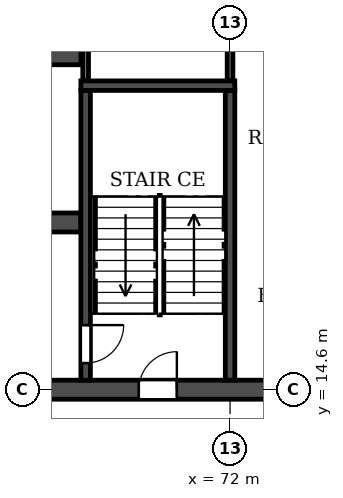
"""IFC4 building model, lengths in metres.
Left out: names, types, materials, properties, quantities, classifications, styles, units other than length and angle.
Written with IfcOpenShell. Run it as: python <this file> out.ifc"""

import sys

from ifc_helpers import new_model, si_unit, direction, frame, frame_2d, origin, place, context, subcontext, project, spatial, rectangle, extrude, element, fill, save


model = new_model("IFC4")
c1 = context("Model", 3, precision=1e-05, world=origin(), true_north=direction((0.0, 1.0)))
c2 = subcontext(c1, "Body", "Model", "MODEL_VIEW")
j1 = project(units=[si_unit("LENGTHUNIT", "METRE"), si_unit("PLANEANGLEUNIT", "RADIAN")], contexts=[c1])
p1 = place(None, origin())
s1 = spatial("IfcSite", under=j1, at=p1, CompositionType="ELEMENT")
p2 = place(p1, origin())
s2 = spatial("IfcBuilding", under=s1, at=p2, CompositionType="ELEMENT")
p3 = place(p2, frame((0.0, 0.0, 72.9)))
s3 = spatial("IfcBuildingStorey", under=s2, at=p3, CompositionType="ELEMENT", Elevation=72.9)
p4 = place(p3, frame((8.6, 14.6, 0.0), z_axis=(0.0, 0.0, 1.0), x_axis=(1.0, 0.0, 0.0)))
e1 = element("IfcWall", 1, at=p4, inside=s3, PredefinedType="SOLIDWALL", context=c2, shape_type="SweptSolid", body=[
    extrude(rectangle(XDim=84.8, YDim=0.5, at=frame_2d((42.4, 0.0))), origin(), (0.0, 0.0, 1.0), 3.06),
])
p5 = place(p4, frame((2.25, 0.0, 0.0)))
e2 = element("IfcOpeningElement", 2, at=p5, cuts=e1, PredefinedType="OPENING", context=c2, shape_type="SweptSolid", body=[
    extrude(rectangle(XDim=1.0, YDim=2.1, at=frame_2d((0.5, 1.05))), frame((0.0, 0.26, 0.0), z_axis=(0.0, -1.0, 0.0), x_axis=(1.0, 0.0, 0.0)), (0.0, 0.0, 1.0), 0.52),
])
p6 = place(p4, frame((6.95, 0.0, 0.0)))
e3 = element("IfcOpeningElement", 3, at=p6, cuts=e1, PredefinedType="OPENING", context=c2, shape_type="SweptSolid", body=[
    extrude(rectangle(XDim=1.0, YDim=2.1, at=frame_2d((0.5, 1.05))), frame((0.0, 0.26, 0.0), z_axis=(0.0, -1.0, 0.0), x_axis=(1.0, 0.0, 0.0)), (0.0, 0.0, 1.0), 0.52),
])
p7 = place(p4, frame((10.3, 0.0, 0.0)))
e4 = element("IfcOpeningElement", 4, at=p7, cuts=e1, PredefinedType="OPENING", context=c2, shape_type="SweptSolid", body=[
    extrude(rectangle(XDim=1.0, YDim=2.1, at=frame_2d((0.5, 1.05))), frame((0.0, 0.26, 0.0), z_axis=(0.0, -1.0, 0.0), x_axis=(1.0, 0.0, 0.0)), (0.0, 0.0, 1.0), 0.52),
])
p8 = place(p4, frame((18.2, 0.0, 0.0)))
e5 = element("IfcOpeningElement", 5, at=p8, cuts=e1, PredefinedType="OPENING", context=c2, shape_type="SweptSolid", body=[
    extrude(rectangle(XDim=1.0, YDim=2.1, at=frame_2d((0.5, 1.05))), frame((0.0, 0.26, 0.0), z_axis=(0.0, -1.0, 0.0), x_axis=(1.0, 0.0, 0.0)), (0.0, 0.0, 1.0), 0.52),
])
p9 = place(p4, frame((22.8, 0.0, 0.0)))
e6 = element("IfcOpeningElement", 6, at=p9, cuts=e1, PredefinedType="OPENING", context=c2, shape_type="SweptSolid", body=[
    extrude(rectangle(XDim=1.0, YDim=2.1, at=frame_2d((0.5, 1.05))), frame((0.0, 0.26, 0.0), z_axis=(0.0, -1.0, 0.0), x_axis=(1.0, 0.0, 0.0)), (0.0, 0.0, 1.0), 0.52),
])
p10 = place(p4, frame((35.4, 0.0, 0.0)))
e7 = element("IfcOpeningElement", 7, at=p10, cuts=e1, PredefinedType="OPENING", context=c2, shape_type="SweptSolid", body=[
    extrude(rectangle(XDim=1.0, YDim=2.1, at=frame_2d((0.5, 1.05))), frame((0.0, 0.26, 0.0), z_axis=(0.0, -1.0, 0.0), x_axis=(1.0, 0.0, 0.0)), (0.0, 0.0, 1.0), 0.52),
])
p11 = place(p4, frame((39.3, 0.0, 0.0)))
e8 = element("IfcOpeningElement", 8, at=p11, cuts=e1, PredefinedType="OPENING", context=c2, shape_type="SweptSolid", body=[
    extrude(rectangle(XDim=1.0, YDim=2.1, at=frame_2d((0.5, 1.05))), frame((0.0, 0.26, 0.0), z_axis=(0.0, -1.0, 0.0), x_axis=(1.0, 0.0, 0.0)), (0.0, 0.0, 1.0), 0.52),
])
p12 = place(p4, frame((41.9, 0.0, 0.0)))
e9 = element("IfcOpeningElement", 9, at=p12, cuts=e1, PredefinedType="OPENING", context=c2, shape_type="SweptSolid", body=[
    extrude(rectangle(XDim=1.0, YDim=2.1, at=frame_2d((0.5, 1.05))), frame((0.0, 0.26, 0.0), z_axis=(0.0, -1.0, 0.0), x_axis=(1.0, 0.0, 0.0)), (0.0, 0.0, 1.0), 0.52),
])
p13 = place(p4, frame((44.5, 0.0, 0.0)))
e10 = element("IfcOpeningElement", 10, at=p13, cuts=e1, PredefinedType="OPENING", context=c2, shape_type="SweptSolid", body=[
    extrude(rectangle(XDim=1.0, YDim=2.1, at=frame_2d((0.5, 1.05))), frame((0.0, 0.26, 0.0), z_axis=(0.0, -1.0, 0.0), x_axis=(1.0, 0.0, 0.0)), (0.0, 0.0, 1.0), 0.52),
])
p14 = place(p4, frame((48.4, 0.0, 0.0)))
e11 = element("IfcOpeningElement", 11, at=p14, cuts=e1, PredefinedType="OPENING", context=c2, shape_type="SweptSolid", body=[
    extrude(rectangle(XDim=1.0, YDim=2.1, at=frame_2d((0.5, 1.05))), frame((0.0, 0.26, 0.0), z_axis=(0.0, -1.0, 0.0), x_axis=(1.0, 0.0, 0.0)), (0.0, 0.0, 1.0), 0.52),
])
p15 = place(p4, frame((61.0, 0.0, 0.0)))
e12 = element("IfcOpeningElement", 12, at=p15, cuts=e1, PredefinedType="OPENING", context=c2, shape_type="SweptSolid", body=[
    extrude(rectangle(XDim=1.0, YDim=2.1, at=frame_2d((0.5, 1.05))), frame((0.0, 0.26, 0.0), z_axis=(0.0, -1.0, 0.0), x_axis=(1.0, 0.0, 0.0)), (0.0, 0.0, 1.0), 0.52),
])
p16 = place(p4, frame((65.6, 0.0, 0.0)))
e13 = element("IfcOpeningElement", 13, at=p16, cuts=e1, PredefinedType="OPENING", context=c2, shape_type="SweptSolid", body=[
    extrude(rectangle(XDim=1.0, YDim=2.1, at=frame_2d((0.5, 1.05))), frame((0.0, 0.26, 0.0), z_axis=(0.0, -1.0, 0.0), x_axis=(1.0, 0.0, 0.0)), (0.0, 0.0, 1.0), 0.52),
])
p17 = place(p4, frame((73.5, 0.0, 0.0)))
e14 = element("IfcOpeningElement", 14, at=p17, cuts=e1, PredefinedType="OPENING", context=c2, shape_type="SweptSolid", body=[
    extrude(rectangle(XDim=1.0, YDim=2.1, at=frame_2d((0.5, 1.05))), frame((0.0, 0.26, 0.0), z_axis=(0.0, -1.0, 0.0), x_axis=(1.0, 0.0, 0.0)), (0.0, 0.0, 1.0), 0.52),
])
p18 = place(p4, frame((76.55, 0.0, 0.0)))
e15 = element("IfcOpeningElement", 15, at=p18, cuts=e1, PredefinedType="OPENING", context=c2, shape_type="SweptSolid", body=[
    extrude(rectangle(XDim=1.0, YDim=2.1, at=frame_2d((0.5, 1.05))), frame((0.0, 0.26, 0.0), z_axis=(0.0, -1.0, 0.0), x_axis=(1.0, 0.0, 0.0)), (0.0, 0.0, 1.0), 0.52),
])
p19 = place(p4, frame((81.0, 0.0, 0.0)))
e16 = element("IfcOpeningElement", 16, at=p19, cuts=e1, PredefinedType="OPENING", context=c2, shape_type="SweptSolid", body=[
    extrude(rectangle(XDim=1.5, YDim=2.1, at=frame_2d((0.75, 1.05))), frame((0.0, 0.26, 0.0), z_axis=(0.0, -1.0, 0.0), x_axis=(1.0, 0.0, 0.0)), (0.0, 0.0, 1.0), 0.52),
])
p20 = place(p3, frame((33.925, 19.0, 0.0), z_axis=(0.0, 0.0, 1.0), x_axis=(1.0, 0.0, 0.0)))
e17 = element("IfcWall", 17, at=p20, inside=s3, PredefinedType="SOLIDWALL", context=c2, shape_type="SweptSolid", body=[
    extrude(rectangle(XDim=34.15, YDim=0.5, at=frame_2d((17.075, 0.0))), origin(), (0.0, 0.0, 1.0), 3.06),
])
p21 = place(p20, frame((16.175, 0.0, 0.0)))
e18 = element("IfcOpeningElement", 18, at=p21, cuts=e17, PredefinedType="OPENING", context=c2, shape_type="SweptSolid", body=[
    extrude(rectangle(XDim=1.8, YDim=2.1, at=frame_2d((0.9, 1.05))), frame((0.0, 0.26, 0.0), z_axis=(0.0, -1.0, 0.0), x_axis=(1.0, 0.0, 0.0)), (0.0, 0.0, 1.0), 0.52),
])
p22 = place(p20, frame((1.525, 0.0, 0.0)))
e19 = element("IfcOpeningElement", 19, at=p22, cuts=e17, PredefinedType="OPENING", context=c2, shape_type="SweptSolid", body=[
    extrude(rectangle(XDim=1.8, YDim=2.1, at=frame_2d((0.9, 1.05))), frame((0.0, 0.26, 0.0), z_axis=(0.0, -1.0, 0.0), x_axis=(1.0, 0.0, 0.0)), (0.0, 0.0, 1.0), 0.52),
])
p23 = place(p20, frame((8.725, 0.0, 0.0)))
e20 = element("IfcOpeningElement", 20, at=p23, cuts=e17, PredefinedType="OPENING", context=c2, shape_type="SweptSolid", body=[
    extrude(rectangle(XDim=1.1, YDim=2.1, at=frame_2d((0.55, 1.05))), frame((0.0, 0.26, 0.0), z_axis=(0.0, -1.0, 0.0), x_axis=(1.0, 0.0, 0.0)), (0.0, 0.0, 1.0), 0.52),
])
p24 = place(p20, frame((11.325, 0.0, 0.0)))
e21 = element("IfcOpeningElement", 21, at=p24, cuts=e17, PredefinedType="OPENING", context=c2, shape_type="SweptSolid", body=[
    extrude(rectangle(XDim=1.1, YDim=2.1, at=frame_2d((0.55, 1.05))), frame((0.0, 0.26, 0.0), z_axis=(0.0, -1.0, 0.0), x_axis=(1.0, 0.0, 0.0)), (0.0, 0.0, 1.0), 0.52),
])
p25 = place(p20, frame((13.925, 0.0, 0.0)))
e22 = element("IfcOpeningElement", 22, at=p25, cuts=e17, PredefinedType="OPENING", context=c2, shape_type="SweptSolid", body=[
    extrude(rectangle(XDim=1.1, YDim=2.1, at=frame_2d((0.55, 1.05))), frame((0.0, 0.26, 0.0), z_axis=(0.0, -1.0, 0.0), x_axis=(1.0, 0.0, 0.0)), (0.0, 0.0, 1.0), 0.52),
])
p26 = place(p20, frame((19.125, 0.0, 0.0)))
e23 = element("IfcOpeningElement", 23, at=p26, cuts=e17, PredefinedType="OPENING", context=c2, shape_type="SweptSolid", body=[
    extrude(rectangle(XDim=1.1, YDim=2.1, at=frame_2d((0.55, 1.05))), frame((0.0, 0.26, 0.0), z_axis=(0.0, -1.0, 0.0), x_axis=(1.0, 0.0, 0.0)), (0.0, 0.0, 1.0), 0.52),
])
p27 = place(p20, frame((21.725, 0.0, 0.0)))
e24 = element("IfcOpeningElement", 24, at=p27, cuts=e17, PredefinedType="OPENING", context=c2, shape_type="SweptSolid", body=[
    extrude(rectangle(XDim=1.1, YDim=2.1, at=frame_2d((0.55, 1.05))), frame((0.0, 0.26, 0.0), z_axis=(0.0, -1.0, 0.0), x_axis=(1.0, 0.0, 0.0)), (0.0, 0.0, 1.0), 0.52),
])
p28 = place(p20, frame((24.325, 0.0, 0.0)))
e25 = element("IfcOpeningElement", 25, at=p28, cuts=e17, PredefinedType="OPENING", context=c2, shape_type="SweptSolid", body=[
    extrude(rectangle(XDim=1.1, YDim=2.1, at=frame_2d((0.55, 1.05))), frame((0.0, 0.26, 0.0), z_axis=(0.0, -1.0, 0.0), x_axis=(1.0, 0.0, 0.0)), (0.0, 0.0, 1.0), 0.52),
])
p29 = place(p20, frame((30.825, 0.0, 0.0)))
e26 = element("IfcOpeningElement", 26, at=p29, cuts=e17, PredefinedType="OPENING", context=c2, shape_type="SweptSolid", body=[
    extrude(rectangle(XDim=1.8, YDim=2.1, at=frame_2d((0.9, 1.05))), frame((0.0, 0.26, 0.0), z_axis=(0.0, -1.0, 0.0), x_axis=(1.0, 0.0, 0.0)), (0.0, 0.0, 1.0), 0.52),
])
p30 = place(p3, frame((33.925, 23.4, 0.0), z_axis=(0.0, 0.0, 1.0), x_axis=(1.0, 0.0, 0.0)))
e27 = element("IfcWall", 27, at=p30, inside=s3, PredefinedType="SOLIDWALL", context=c2, shape_type="SweptSolid", body=[
    extrude(rectangle(XDim=34.15, YDim=0.5, at=frame_2d((17.075, 0.0))), origin(), (0.0, 0.0, 1.0), 3.06),
])
p31 = place(p30, frame((16.175, 0.0, 0.0)))
e28 = element("IfcOpeningElement", 28, at=p31, cuts=e27, PredefinedType="OPENING", context=c2, shape_type="SweptSolid", body=[
    extrude(rectangle(XDim=1.8, YDim=2.1, at=frame_2d((0.9, 1.05))), frame((0.0, 0.26, 0.0), z_axis=(0.0, -1.0, 0.0), x_axis=(1.0, 0.0, 0.0)), (0.0, 0.0, 1.0), 0.52),
])
p32 = place(p30, frame((11.025, 0.0, 0.0)))
e29 = element("IfcOpeningElement", 29, at=p32, cuts=e27, PredefinedType="OPENING", context=c2, shape_type="SweptSolid", body=[
    extrude(rectangle(XDim=1.1, YDim=2.1, at=frame_2d((0.55, 1.05))), frame((0.0, 0.26, 0.0), z_axis=(0.0, -1.0, 0.0), x_axis=(1.0, 0.0, 0.0)), (0.0, 0.0, 1.0), 0.52),
])
p33 = place(p3, frame((68.2, 14.85, 0.0), z_axis=(0.0, 0.0, 1.0), x_axis=(0.0, 1.0, 0.0)))
e30 = element("IfcWall", 30, at=p33, inside=s3, PredefinedType="SOLIDWALL", context=c2, shape_type="SweptSolid", body=[
    extrude(rectangle(XDim=7.625, YDim=0.25, at=frame_2d((3.812, 0.0))), origin(), (0.0, 0.0, 1.0), 3.06),
])
p34 = place(p33, frame((0.45, 0.0, 0.0)))
e31 = element("IfcOpeningElement", 31, at=p34, cuts=e30, PredefinedType="OPENING", context=c2, shape_type="SweptSolid", body=[
    extrude(rectangle(XDim=1.0, YDim=2.1, at=frame_2d((0.5, 1.05))), frame((0.0, 0.135, 0.0), z_axis=(0.0, -1.0, 0.0), x_axis=(1.0, 0.0, 0.0)), (0.0, 0.0, 1.0), 0.27),
])
p35 = place(p3, frame((72.0, 14.85, 0.0), z_axis=(0.0, 0.0, 1.0), x_axis=(0.0, 1.0, 0.0)))
e32 = element("IfcWall", 32, at=p35, inside=s3, PredefinedType="SOLIDWALL", context=c2, shape_type="SweptSolid", body=[
    extrude(rectangle(XDim=7.625, YDim=0.25, at=frame_2d((3.812, 0.0))), origin(), (0.0, 0.0, 1.0), 3.06),
])
p36 = place(p3, frame((68.075, 22.6, 0.0), z_axis=(0.0, 0.0, 1.0), x_axis=(1.0, 0.0, 0.0)))
e33 = element("IfcWall", 33, at=p36, inside=s3, PredefinedType="SOLIDWALL", context=c2, shape_type="SweptSolid", body=[
    extrude(rectangle(XDim=4.05, YDim=0.25, at=frame_2d((2.025, 0.0))), origin(), (0.0, 0.0, 1.0), 3.06),
])
for number, where, z_axis, x_axis in (
    (34, (68.2, 22.735, 0.0), (0.0, 0.0, 1.0), (0.0, 1.0, 0.0)),
    (35, (72.0, 22.735, 0.0), (0.0, 0.0, 1.0), (0.0, 1.0, 0.0)),
):
    element("IfcWall", number, at=place(p3, frame(where, z_axis=z_axis, x_axis=x_axis)), inside=s3, PredefinedType="PARTITIONING", context=c2, shape_type="SweptSolid", body=[
        extrude(rectangle(XDim=4.805, YDim=0.15, at=frame_2d((2.402, 0.0))), origin(), (0.0, 0.0, 1.0), 3.06),
    ])
p37 = place(p15, origin())
e36 = element("IfcDoor", 36, at=p37, inside=s3, OperationType="SINGLE_SWING_RIGHT", PredefinedType="DOOR", context=c2, shape_type="SweptSolid", body=[
    extrude(rectangle(XDim=1.0, YDim=2.1, at=frame_2d((0.5, 1.05))), frame((0.0, 0.025, 0.0), z_axis=(0.0, -1.0, 0.0), x_axis=(1.0, 0.0, 0.0)), (0.0, 0.0, 1.0), 0.05),
])
fill(e12, e36)
p38 = place(p34, frame((1.0, 0.0, 0.0), z_axis=(0.0, 0.0, 1.0), x_axis=(-1.0, 0.0, 0.0)))
e37 = element("IfcDoor", 37, at=p38, inside=s3, OperationType="SINGLE_SWING_LEFT", PredefinedType="DOOR", context=c2, shape_type="SweptSolid", body=[
    extrude(rectangle(XDim=1.0, YDim=2.1, at=frame_2d((0.5, 1.05))), frame((0.0, 0.025, 0.0), z_axis=(0.0, -1.0, 0.0), x_axis=(1.0, 0.0, 0.0)), (0.0, 0.0, 1.0), 0.05),
])
fill(e31, e37)
save(model, sys.argv[1])
